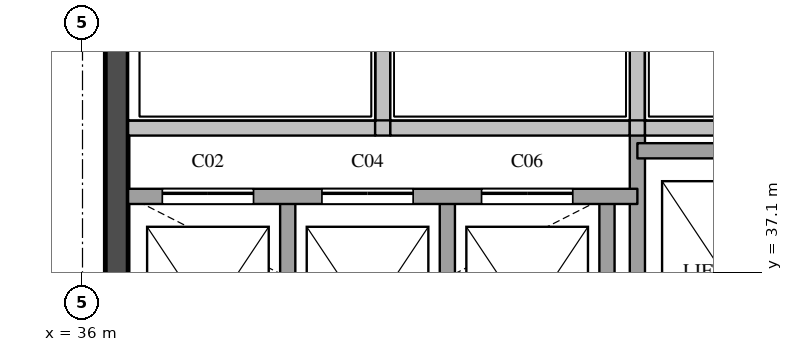
"""IFC4 building model, lengths in metres.
Left out: names, types, materials, properties, quantities, classifications, styles, units other than length and angle.
Written with IfcOpenShell. Run it as: python <this file> out.ifc"""

import sys

from ifc_helpers import new_model, si_unit, direction, frame, frame_2d, origin, place, context, subcontext, project, spatial, rectangle, extrude, element, fill, save


model = new_model("IFC4")
c1 = context("Model", 3, precision=1e-05, world=origin(), true_north=direction((0.0, 1.0)))
c2 = subcontext(c1, "Body", "Model", "MODEL_VIEW")
j1 = project(units=[si_unit("LENGTHUNIT", "METRE"), si_unit("PLANEANGLEUNIT", "RADIAN")], contexts=[c1])
p1 = place(None, origin())
s1 = spatial("IfcSite", under=j1, at=p1, CompositionType="ELEMENT")
p2 = place(p1, origin())
s2 = spatial("IfcBuilding", under=s1, at=p2, CompositionType="ELEMENT")
p3 = place(p2, frame((0.0, 0.0, 290.2)))
s3 = spatial("IfcBuildingStorey", under=s2, at=p3, CompositionType="ELEMENT", Elevation=290.2)
p4 = place(p3, frame((36.45, 29.1, 0.0), z_axis=(0.0, 0.0, 1.0), x_axis=(0.0, 1.0, 0.0)))
e1 = element("IfcWall", 1, at=p4, inside=s3, PredefinedType="SHEAR", context=c2, shape_type="SweptSolid", body=[
    extrude(rectangle(XDim=20.3, YDim=0.3, at=frame_2d((10.15, 0.0))), origin(), (0.0, 0.0, 1.0), 4.5),
])
p5 = place(p4, frame((3.6, 0.0, 0.0)))
e2 = element("IfcOpeningElement", 2, at=p5, cuts=e1, PredefinedType="OPENING", context=c2, shape_type="SweptSolid", body=[
    extrude(rectangle(XDim=1.8, YDim=2.1, at=frame_2d((0.9, 1.05))), frame((0.0, 0.16, 0.0), z_axis=(0.0, -1.0, 0.0), x_axis=(1.0, 0.0, 0.0)), (0.0, 0.0, 1.0), 0.32),
])
p6 = place(p4, frame((16.4, 0.0, 0.0)))
e3 = element("IfcOpeningElement", 3, at=p6, cuts=e1, PredefinedType="OPENING", context=c2, shape_type="SweptSolid", body=[
    extrude(rectangle(XDim=1.0, YDim=2.1, at=frame_2d((0.5, 1.05))), frame((0.0, 0.16, 0.0), z_axis=(0.0, -1.0, 0.0), x_axis=(1.0, 0.0, 0.0)), (0.0, 0.0, 1.0), 0.32),
])
p7 = place(p3, frame((38.7, 34.9, 0.0), z_axis=(0.0, 0.0, 1.0), x_axis=(0.0, 1.0, 0.0)))
e4 = element("IfcWall", 4, at=p7, inside=s3, PredefinedType="SOLIDWALL", context=c2, shape_type="SweptSolid", body=[
    extrude(rectangle(XDim=3.2, YDim=0.2, at=frame_2d((1.6, 0.0))), origin(), (0.0, 0.0, 1.0), 4.5),
])
p8 = place(p3, frame((39.95, 39.0, 0.0), z_axis=(0.0, 0.0, 1.0), x_axis=(0.0, 1.0, 0.0)))
e5 = element("IfcWall", 5, at=p8, inside=s3, PredefinedType="SOLIDWALL", context=c2, shape_type="SweptSolid", body=[
    extrude(rectangle(XDim=2.06, YDim=0.2, at=frame_2d((1.03, 0.0))), origin(), (0.0, 0.0, 1.0), 4.5),
])
for number, where, z_axis, x_axis in (
    (6, (40.8, 34.9, 0.0), (0.0, 0.0, 1.0), (0.0, 1.0, 0.0)),
    (7, (42.9, 34.9, 0.0), (0.0, 0.0, 1.0), (0.0, 1.0, 0.0)),
):
    element("IfcWall", number, at=place(p3, frame(where, z_axis=z_axis, x_axis=x_axis)), inside=s3, PredefinedType="SOLIDWALL", context=c2, shape_type="SweptSolid", body=[
        extrude(rectangle(XDim=3.2, YDim=0.2, at=frame_2d((1.6, 0.0))), origin(), (0.0, 0.0, 1.0), 4.5),
    ])
p9 = place(p3, frame((43.3, 29.1, 0.0), z_axis=(0.0, 0.0, 1.0), x_axis=(0.0, 1.0, 0.0)))
e8 = element("IfcWall", 8, at=p9, inside=s3, PredefinedType="SOLIDWALL", context=c2, shape_type="SweptSolid", body=[
    extrude(rectangle(XDim=9.9, YDim=0.2, at=frame_2d((4.95, 0.0))), origin(), (0.0, 0.0, 1.0), 4.5),
])
p10 = place(p3, frame((43.3, 39.0, 0.0), z_axis=(0.0, 0.0, 1.0), x_axis=(0.0, 1.0, 0.0)))
e9 = element("IfcWall", 9, at=p10, inside=s3, PredefinedType="SOLIDWALL", context=c2, shape_type="SweptSolid", body=[
    extrude(rectangle(XDim=2.06, YDim=0.2, at=frame_2d((1.03, 0.0))), origin(), (0.0, 0.0, 1.0), 4.5),
])
p11 = place(p3, frame((36.6, 38.1, 0.0), z_axis=(0.0, 0.0, 1.0), x_axis=(1.0, 0.0, 0.0)))
e10 = element("IfcWall", 10, at=p11, inside=s3, PredefinedType="SOLIDWALL", context=c2, shape_type="SweptSolid", body=[
    extrude(rectangle(XDim=6.7, YDim=0.2, at=frame_2d((3.35, 0.0))), origin(), (0.0, 0.0, 1.0), 4.5),
])
p12 = place(p11, frame((0.45, 0.0, 0.0)))
e11 = element("IfcOpeningElement", 11, at=p12, cuts=e10, PredefinedType="OPENING", context=c2, shape_type="SweptSolid", body=[
    extrude(rectangle(XDim=1.2, YDim=2.1, at=frame_2d((0.6, 1.05))), frame((0.0, 0.11, 0.0), z_axis=(0.0, -1.0, 0.0), x_axis=(1.0, 0.0, 0.0)), (0.0, 0.0, 1.0), 0.22),
])
p13 = place(p11, frame((2.55, 0.0, 0.0)))
e12 = element("IfcOpeningElement", 12, at=p13, cuts=e10, PredefinedType="OPENING", context=c2, shape_type="SweptSolid", body=[
    extrude(rectangle(XDim=1.2, YDim=2.1, at=frame_2d((0.6, 1.05))), frame((0.0, 0.11, 0.0), z_axis=(0.0, -1.0, 0.0), x_axis=(1.0, 0.0, 0.0)), (0.0, 0.0, 1.0), 0.22),
])
p14 = place(p11, frame((4.65, 0.0, 0.0)))
e13 = element("IfcOpeningElement", 13, at=p14, cuts=e10, PredefinedType="OPENING", context=c2, shape_type="SweptSolid", body=[
    extrude(rectangle(XDim=1.2, YDim=2.1, at=frame_2d((0.6, 1.05))), frame((0.0, 0.11, 0.0), z_axis=(0.0, -1.0, 0.0), x_axis=(1.0, 0.0, 0.0)), (0.0, 0.0, 1.0), 0.22),
])
p15 = place(p3, frame((43.3, 38.7, 0.0), z_axis=(0.0, 0.0, 1.0), x_axis=(1.0, 0.0, 0.0)))
e14 = element("IfcWall", 14, at=p15, inside=s3, PredefinedType="SOLIDWALL", context=c2, shape_type="SweptSolid", body=[
    extrude(rectangle(XDim=4.5, YDim=0.2, at=frame_2d((2.25, 0.0))), origin(), (0.0, 0.0, 1.0), 4.5),
])
p16 = place(p3, frame((36.6, 39.0, 0.0), z_axis=(0.0, 0.0, 1.0), x_axis=(1.0, 0.0, 0.0)))
e15 = element("IfcWall", 15, at=p16, inside=s3, PredefinedType="SOLIDWALL", context=c2, shape_type="SweptSolid", body=[
    extrude(rectangle(XDim=3.25, YDim=0.2, at=frame_2d((1.625, 0.0))), origin(), (0.0, 0.0, 1.0), 4.5),
])
p17 = place(p3, frame((39.85, 39.0, 0.0), z_axis=(0.0, 0.0, 1.0), x_axis=(1.0, 0.0, 0.0)))
e16 = element("IfcWall", 16, at=p17, inside=s3, PredefinedType="SOLIDWALL", context=c2, shape_type="SweptSolid", body=[
    extrude(rectangle(XDim=0.2, YDim=0.2, at=frame_2d((0.1, 0.0))), origin(), (0.0, 0.0, 1.0), 4.5),
])
p18 = place(p3, frame((40.05, 39.0, 0.0), z_axis=(0.0, 0.0, 1.0), x_axis=(1.0, 0.0, 0.0)))
e17 = element("IfcWall", 17, at=p18, inside=s3, PredefinedType="SOLIDWALL", context=c2, shape_type="SweptSolid", body=[
    extrude(rectangle(XDim=3.15, YDim=0.2, at=frame_2d((1.575, 0.0))), origin(), (0.0, 0.0, 1.0), 4.5),
])
p19 = place(p3, frame((43.2, 39.0, 0.0), z_axis=(0.0, 0.0, 1.0), x_axis=(1.0, 0.0, 0.0)))
e18 = element("IfcWall", 18, at=p19, inside=s3, PredefinedType="SOLIDWALL", context=c2, shape_type="SweptSolid", body=[
    extrude(rectangle(XDim=0.2, YDim=0.2, at=frame_2d((0.1, 0.0))), origin(), (0.0, 0.0, 1.0), 4.5),
])
p20 = place(p3, frame((43.4, 39.0, 0.0), z_axis=(0.0, 0.0, 1.0), x_axis=(1.0, 0.0, 0.0)))
e19 = element("IfcWall", 19, at=p20, inside=s3, PredefinedType="SOLIDWALL", context=c2, shape_type="SweptSolid", body=[
    extrude(rectangle(XDim=3.25, YDim=0.2, at=frame_2d((1.625, 0.0))), origin(), (0.0, 0.0, 1.0), 4.5),
])
p21 = place(p12, origin())
e20 = element("IfcDoor", 20, at=p21, inside=s3, OperationType="SLIDING_TO_LEFT", PredefinedType="DOOR", context=c2, shape_type="SweptSolid", body=[
    extrude(rectangle(XDim=1.2, YDim=2.1, at=frame_2d((0.6, 1.05))), frame((0.0, 0.025, 0.0), z_axis=(0.0, -1.0, 0.0), x_axis=(1.0, 0.0, 0.0)), (0.0, 0.0, 1.0), 0.05),
])
fill(e11, e20)
p22 = place(p13, origin())
e21 = element("IfcDoor", 21, at=p22, inside=s3, OperationType="SLIDING_TO_LEFT", PredefinedType="DOOR", context=c2, shape_type="SweptSolid", body=[
    extrude(rectangle(XDim=1.2, YDim=2.1, at=frame_2d((0.6, 1.05))), frame((0.0, 0.025, 0.0), z_axis=(0.0, -1.0, 0.0), x_axis=(1.0, 0.0, 0.0)), (0.0, 0.0, 1.0), 0.05),
])
fill(e12, e21)
p23 = place(p14, origin())
e22 = element("IfcDoor", 22, at=p23, inside=s3, OperationType="SLIDING_TO_LEFT", PredefinedType="DOOR", context=c2, shape_type="SweptSolid", body=[
    extrude(rectangle(XDim=1.2, YDim=2.1, at=frame_2d((0.6, 1.05))), frame((0.0, 0.025, 0.0), z_axis=(0.0, -1.0, 0.0), x_axis=(1.0, 0.0, 0.0)), (0.0, 0.0, 1.0), 0.05),
])
fill(e13, e22)
save(model, sys.argv[1])
